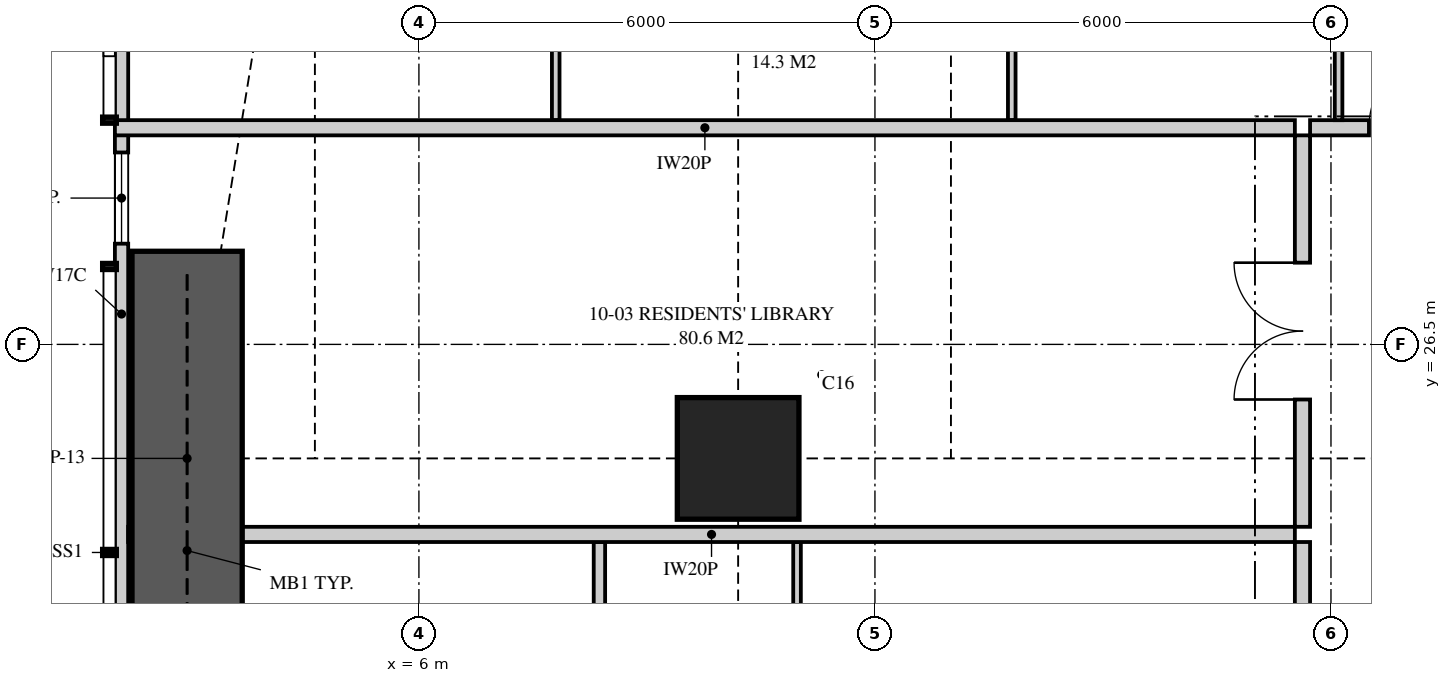
"""IFC4 building model, lengths in metres.
Left out: names, types, materials, properties, quantities, classifications, styles, units other than length and angle.
Written with IfcOpenShell. Run it as: python <this file> out.ifc"""

import sys

from ifc_helpers import new_model, si_unit, direction, frame, frame_2d, origin, origin_2d, place, context, subcontext, project, spatial, polyline, rectangle, outline, extrude, element, fill, save


model = new_model("IFC4")
c1 = context("Model", 3, precision=1e-05, world=origin(), true_north=direction((0.0, 1.0)))
c2 = subcontext(c1, "Body", "Model", "MODEL_VIEW")
j1 = project(units=[si_unit("LENGTHUNIT", "METRE"), si_unit("PLANEANGLEUNIT", "RADIAN")], contexts=[c1])
p1 = place(None, origin())
s1 = spatial("IfcSite", under=j1, at=p1, CompositionType="ELEMENT")
p2 = place(p1, origin())
s2 = spatial("IfcBuilding", under=s1, at=p2, CompositionType="ELEMENT")
p3 = place(p2, frame((0.0, 0.0, 41.1)))
s3 = spatial("IfcBuildingStorey", under=s2, at=p3, CompositionType="ELEMENT", Elevation=41.1)
p4 = place(p3, frame((10.2, 25.0, 0.0), z_axis=(0.0, 0.0, 1.0), x_axis=(1.0, 0.0, 0.0)))
e1 = element("IfcColumn", 1, at=p4, inside=s3, PredefinedType="COLUMN", context=c2, shape_type="SweptSolid", body=[
    extrude(rectangle(XDim=1.6, YDim=1.6, at=origin_2d()), origin(), (0.0, 0.0, 1.0), 3.35),
])
p5 = place(p3, frame((2.087, 34.949, 0.0), z_axis=(0.0, 0.0, 1.0), x_axis=(0.0, -1.0, 0.0)))
e2 = element("IfcWall", 2, at=p5, inside=s3, PredefinedType="SOLIDWALL", context=c2, shape_type="SweptSolid", body=[
    extrude(outline(polyline([(0.0, 0.0), (16.099, 0.0), (16.099, 2.15), (9.949, 2.15), (9.949, 3.11), (9.823, 3.11), (9.823, 2.15), (9.73, 2.15), (9.73, 3.11), (0.0, 3.11), (0.0, 0.0)])), frame((0.0, 0.087, 0.0), z_axis=(0.0, -1.0, 0.0), x_axis=(1.0, 0.0, 0.0)), (0.0, 0.0, 1.0), 0.175),
])
p6 = place(p5, frame((2.757, 0.0, 0.4)))
e3 = element("IfcOpeningElement", 3, at=p6, cuts=e2, PredefinedType="OPENING", context=c2, shape_type="SweptSolid", body=[
    extrude(rectangle(XDim=1.8, YDim=1.7, at=frame_2d((0.9, 0.85))), frame((0.0, 0.097, 0.0), z_axis=(0.0, -1.0, 0.0), x_axis=(1.0, 0.0, 0.0)), (0.0, 0.0, 1.0), 0.195),
])
p7 = place(p5, frame((5.924, 0.0, 0.4)))
e4 = element("IfcOpeningElement", 4, at=p7, cuts=e2, PredefinedType="OPENING", context=c2, shape_type="SweptSolid", body=[
    extrude(rectangle(XDim=1.2, YDim=1.7, at=frame_2d((0.6, 0.85))), frame((0.0, 0.097, 0.0), z_axis=(0.0, -1.0, 0.0), x_axis=(1.0, 0.0, 0.0)), (0.0, 0.0, 1.0), 0.195),
])
p8 = place(p5, frame((12.799, 0.0, 0.4)))
e5 = element("IfcOpeningElement", 5, at=p8, cuts=e2, PredefinedType="OPENING", context=c2, shape_type="SweptSolid", body=[
    extrude(rectangle(XDim=1.8, YDim=1.7, at=frame_2d((0.9, 0.85))), frame((0.0, 0.097, 0.0), z_axis=(0.0, -1.0, 0.0), x_axis=(1.0, 0.0, 0.0)), (0.0, 0.0, 1.0), 0.195),
])
p9 = place(p3, frame((17.725, 29.35, 0.0), z_axis=(0.0, 0.0, 1.0), x_axis=(1.0, 0.0, 0.0)))
e6 = element("IfcWall", 6, at=p9, inside=s3, PredefinedType="PARTITIONING", context=c2, shape_type="SweptSolid", body=[
    extrude(rectangle(XDim=5.375, YDim=0.2, at=frame_2d((2.688, 0.0))), origin(), (0.0, 0.0, 1.0), 3.11),
])
p10 = place(p9, frame((0.775, 0.0, 0.0)))
e7 = element("IfcOpeningElement", 7, at=p10, cuts=e6, PredefinedType="OPENING", context=c2, shape_type="SweptSolid", body=[
    extrude(rectangle(XDim=1.05, YDim=2.2, at=frame_2d((0.525, 1.1))), frame((0.0, 0.11, 0.0), z_axis=(0.0, -1.0, 0.0), x_axis=(1.0, 0.0, 0.0)), (0.0, 0.0, 1.0), 0.22),
])
p11 = place(p3, frame((7.8, 37.825, 0.0), z_axis=(0.0, 0.0, 1.0), x_axis=(0.0, -1.0, 0.0)))
e8 = element("IfcWall", 8, at=p11, inside=s3, PredefinedType="PARTITIONING", context=c2, shape_type="SweptSolid", body=[
    extrude(outline(polyline([(0.0, 0.0), (8.375, 0.0), (8.375, 3.11), (2.697, 3.11), (2.697, 2.15), (0.943, 2.15), (0.943, 3.11), (0.0, 3.11), (0.0, 0.0)])), frame((0.0, 0.05, 0.0), z_axis=(0.0, -1.0, 0.0), x_axis=(1.0, 0.0, 0.0)), (0.0, 0.0, 1.0), 0.1),
])
p12 = place(p11, frame((2.842, 0.0, 0.0)))
e9 = element("IfcOpeningElement", 9, at=p12, cuts=e8, PredefinedType="OPENING", context=c2, shape_type="SweptSolid", body=[
    extrude(rectangle(XDim=0.9, YDim=2.1, at=frame_2d((0.45, 1.05))), frame((0.0, 0.06, 0.0), z_axis=(0.0, -1.0, 0.0), x_axis=(1.0, 0.0, 0.0)), (0.0, 0.0, 1.0), 0.12),
])
p13 = place(p11, frame((6.059, 0.0, 0.0)))
e10 = element("IfcOpeningElement", 10, at=p13, cuts=e8, PredefinedType="OPENING", context=c2, shape_type="SweptSolid", body=[
    extrude(rectangle(XDim=0.9, YDim=2.1, at=frame_2d((0.45, 1.05))), frame((0.0, 0.06, 0.0), z_axis=(0.0, -1.0, 0.0), x_axis=(1.0, 0.0, 0.0)), (0.0, 0.0, 1.0), 0.12),
])
p14 = place(p3, frame((13.8, 37.825, 0.0), z_axis=(0.0, 0.0, 1.0), x_axis=(0.0, -1.0, 0.0)))
e11 = element("IfcWall", 11, at=p14, inside=s3, PredefinedType="PARTITIONING", context=c2, shape_type="SweptSolid", body=[
    extrude(outline(polyline([(1.635, 2.15), (0.0, 2.15), (0.0, 0.0), (8.375, 0.0), (8.375, 3.11), (1.635, 3.11), (1.635, 2.15)]), holes=[polyline([(1.021, 0.126), (0.529, 0.126), (0.529, 0.919), (1.021, 0.919), (1.021, 0.126)]), polyline([(1.021, 1.231), (0.529, 1.231), (0.529, 2.024), (1.021, 2.024), (1.021, 1.231)])]), frame((0.0, 0.05, 0.0), z_axis=(0.0, -1.0, 0.0), x_axis=(1.0, 0.0, 0.0)), (0.0, 0.0, 1.0), 0.1),
])
p15 = place(p14, frame((4.525, 0.0, 0.0)))
e12 = element("IfcOpeningElement", 12, at=p15, cuts=e11, PredefinedType="OPENING", context=c2, shape_type="SweptSolid", body=[
    extrude(rectangle(XDim=0.9, YDim=2.1, at=frame_2d((0.45, 1.05))), frame((0.0, 0.06, 0.0), z_axis=(0.0, -1.0, 0.0), x_axis=(1.0, 0.0, 0.0)), (0.0, 0.0, 1.0), 0.12),
])
p16 = place(p3, frame((18.1, 37.825, 0.0), z_axis=(0.0, 0.0, 1.0), x_axis=(0.0, -1.0, 0.0)))
e13 = element("IfcWall", 13, at=p16, inside=s3, PredefinedType="PARTITIONING", context=c2, shape_type="SweptSolid", body=[
    extrude(outline(polyline([(0.0, 0.0), (8.375, 0.0), (8.375, 3.11), (1.635, 3.11), (1.635, 2.15), (0.0, 2.15), (0.0, 3.11), (0.0, 0.0)])), frame((0.0, 0.05, 0.0), z_axis=(0.0, -1.0, 0.0), x_axis=(1.0, 0.0, 0.0)), (0.0, 0.0, 1.0), 0.1),
])
p17 = place(p16, frame((4.525, 0.0, 0.0)))
e14 = element("IfcOpeningElement", 14, at=p17, cuts=e13, PredefinedType="OPENING", context=c2, shape_type="SweptSolid", body=[
    extrude(rectangle(XDim=0.9, YDim=2.1, at=frame_2d((0.45, 1.05))), frame((0.0, 0.06, 0.0), z_axis=(0.0, -1.0, 0.0), x_axis=(1.0, 0.0, 0.0)), (0.0, 0.0, 1.0), 0.12),
])
p18 = place(p16, frame((5.95, 0.0, 0.0)))
e15 = element("IfcOpeningElement", 15, at=p18, cuts=e13, PredefinedType="OPENING", context=c2, shape_type="SweptSolid", body=[
    extrude(rectangle(XDim=0.9, YDim=2.1, at=frame_2d((0.45, 1.05))), frame((0.0, 0.06, 0.0), z_axis=(0.0, -1.0, 0.0), x_axis=(1.0, 0.0, 0.0)), (0.0, 0.0, 1.0), 0.12),
])
p19 = place(p3, frame((2.0, 29.35, 0.0), z_axis=(0.0, 0.0, 1.0), x_axis=(1.0, 0.0, 0.0)))
e16 = element("IfcWall", 16, at=p19, inside=s3, PredefinedType="PARTITIONING", context=c2, shape_type="SweptSolid", body=[
    extrude(outline(polyline([(0.0, 0.0), (15.525, 0.0), (15.525, 3.11), (11.337, 3.11), (11.337, 2.541), (10.663, 2.541), (10.663, 3.11), (9.51, 3.11), (9.51, 2.51), (6.89, 2.51), (6.89, 3.11), (2.969, 3.11), (2.969, 2.541), (2.577, 2.541), (2.577, 2.15), (0.733, 2.15), (0.733, 3.11), (0.0, 3.11), (0.0, 0.0)])), frame((0.0, 0.1, 0.0), z_axis=(0.0, -1.0, 0.0), x_axis=(1.0, 0.0, 0.0)), (0.0, 0.0, 1.0), 0.2),
])
p20 = place(p3, frame((2.175, 24.0, 0.0), z_axis=(0.0, 0.0, 1.0), x_axis=(1.0, 0.0, 0.0)))
e17 = element("IfcWall", 17, at=p20, inside=s3, PredefinedType="PARTITIONING", context=c2, shape_type="SweptSolid", body=[
    extrude(outline(polyline([(0.529, 2.15), (0.0, 2.15), (0.0, 0.0), (0.529, 0.0), (0.529, 0.815), (1.021, 0.815), (1.021, 0.0), (15.35, 0.0), (15.35, 3.11), (9.335, 3.11), (9.335, 2.51), (6.715, 2.51), (6.715, 3.11), (1.685, 3.11), (1.685, 2.15), (1.021, 2.15), (1.021, 1.335), (0.529, 1.335), (0.529, 2.15)])), frame((0.0, 0.1, 0.0), z_axis=(0.0, -1.0, 0.0), x_axis=(1.0, 0.0, 0.0)), (0.0, 0.0, 1.0), 0.2),
])
p21 = place(p3, frame((17.625, 14.1, 0.0), z_axis=(0.0, 0.0, 1.0), x_axis=(0.0, 1.0, 0.0)))
e18 = element("IfcWall", 18, at=p21, inside=s3, PredefinedType="PARTITIONING", context=c2, shape_type="SweptSolid", body=[
    extrude(rectangle(XDim=9.8, YDim=0.2, at=frame_2d((4.9, 0.0))), origin(), (0.0, 0.0, 1.0), 3.11),
])
p22 = place(p21, frame((4.4, 0.0, 0.0)))
e19 = element("IfcOpeningElement", 19, at=p22, cuts=e18, PredefinedType="OPENING", context=c2, shape_type="SweptSolid", body=[
    extrude(rectangle(XDim=1.05, YDim=2.2, at=frame_2d((0.525, 1.1))), frame((0.0, 0.11, 0.0), z_axis=(0.0, -1.0, 0.0), x_axis=(1.0, 0.0, 0.0)), (0.0, 0.0, 1.0), 0.22),
])
p23 = place(p3, frame((8.375, 20.0, 0.0), z_axis=(0.0, 0.0, 1.0), x_axis=(0.0, 1.0, 0.0)))
e20 = element("IfcWall", 20, at=p23, inside=s3, PredefinedType="PLUMBINGWALL", context=c2, shape_type="SweptSolid", body=[
    extrude(rectangle(XDim=3.9, YDim=0.15, at=frame_2d((1.95, 0.0))), origin(), (0.0, 0.0, 1.0), 3.11),
])
p24 = place(p23, frame((0.4, 0.0, 0.0)))
e21 = element("IfcOpeningElement", 21, at=p24, cuts=e20, PredefinedType="OPENING", context=c2, shape_type="SweptSolid", body=[
    extrude(rectangle(XDim=0.9, YDim=2.1, at=frame_2d((0.45, 1.05))), frame((0.0, 0.085, 0.0), z_axis=(0.0, -1.0, 0.0), x_axis=(1.0, 0.0, 0.0)), (0.0, 0.0, 1.0), 0.17),
])
p25 = place(p3, frame((10.975, 20.0, 0.0), z_axis=(0.0, 0.0, 1.0), x_axis=(0.0, 1.0, 0.0)))
e22 = element("IfcWall", 22, at=p25, inside=s3, PredefinedType="PARTITIONING", context=c2, shape_type="SweptSolid", body=[
    extrude(outline(polyline([(0.0, 0.0), (3.9, 0.0), (3.9, 3.11), (3.9, 2.51), (0.0, 2.51), (0.0, 3.11), (0.0, 0.0)])), frame((0.0, 0.05, 0.0), z_axis=(0.0, -1.0, 0.0), x_axis=(1.0, 0.0, 0.0)), (0.0, 0.0, 1.0), 0.1),
])
p26 = place(p3, frame((17.625, 24.1, 0.0), z_axis=(0.0, 0.0, 1.0), x_axis=(0.0, 1.0, 0.0)))
e23 = element("IfcWall", 23, at=p26, inside=s3, PredefinedType="PARTITIONING", context=c2, shape_type="SweptSolid", body=[
    extrude(outline(polyline([(0.0, 0.0), (5.15, 0.0), (5.15, 3.11), (1.237, 3.11), (1.237, 2.541), (0.562, 2.541), (0.562, 3.11), (0.0, 3.11), (0.0, 0.0)])), frame((0.0, 0.1, 0.0), z_axis=(0.0, -1.0, 0.0), x_axis=(1.0, 0.0, 0.0)), (0.0, 0.0, 1.0), 0.2),
])
p27 = place(p26, frame((1.675, 0.0, 0.0)))
e24 = element("IfcOpeningElement", 24, at=p27, cuts=e23, PredefinedType="OPENING", context=c2, shape_type="SweptSolid", body=[
    extrude(rectangle(XDim=1.8, YDim=2.1, at=frame_2d((0.9, 1.05))), frame((0.0, 0.11, 0.0), z_axis=(0.0, -1.0, 0.0), x_axis=(1.0, 0.0, 0.0)), (0.0, 0.0, 1.0), 0.22),
])
p28 = place(p3, frame((2.95, 22.275, 0.0), z_axis=(0.0, 0.0, 1.0), x_axis=(0.0, 1.0, 0.0)))
e25 = element("IfcWall", 25, at=p28, inside=s3, PredefinedType="SHEAR", context=c2, shape_type="SweptSolid", body=[
    extrude(rectangle(XDim=5.45, YDim=1.45, at=frame_2d((2.725, 0.0))), origin(), (0.0, 0.0, 1.0), 3.35),
])
p29 = place(p7, origin())
e26 = element("IfcWindow", 26, at=p29, inside=s3, PartitioningType="SINGLE_PANEL", PredefinedType="WINDOW", context=c2, shape_type="SweptSolid", body=[
    extrude(rectangle(XDim=1.2, YDim=1.7, at=frame_2d((0.6, 0.85))), frame((0.0, 0.03, 0.0), z_axis=(0.0, -1.0, 0.0), x_axis=(1.0, 0.0, 0.0)), (0.0, 0.0, 1.0), 0.06),
])
fill(e4, e26)
p30 = place(p10, origin())
e27 = element("IfcDoor", 27, at=p30, inside=s3, OperationType="SINGLE_SWING_RIGHT", PredefinedType="DOOR", context=c2, shape_type="SweptSolid", body=[
    extrude(rectangle(XDim=1.05, YDim=2.2, at=frame_2d((0.525, 1.1))), frame((0.0, 0.025, 0.0), z_axis=(0.0, -1.0, 0.0), x_axis=(1.0, 0.0, 0.0)), (0.0, 0.0, 1.0), 0.05),
])
fill(e7, e27)
p31 = place(p27, origin())
e28 = element("IfcDoor", 28, at=p31, inside=s3, OperationType="DOUBLE_DOOR_SINGLE_SWING", PredefinedType="DOOR", context=c2, shape_type="SweptSolid", body=[
    extrude(rectangle(XDim=1.8, YDim=2.1, at=frame_2d((0.9, 1.05))), frame((0.0, 0.025, 0.0), z_axis=(0.0, -1.0, 0.0), x_axis=(1.0, 0.0, 0.0)), (0.0, 0.0, 1.0), 0.05),
])
fill(e24, e28)
save(model, sys.argv[1])
